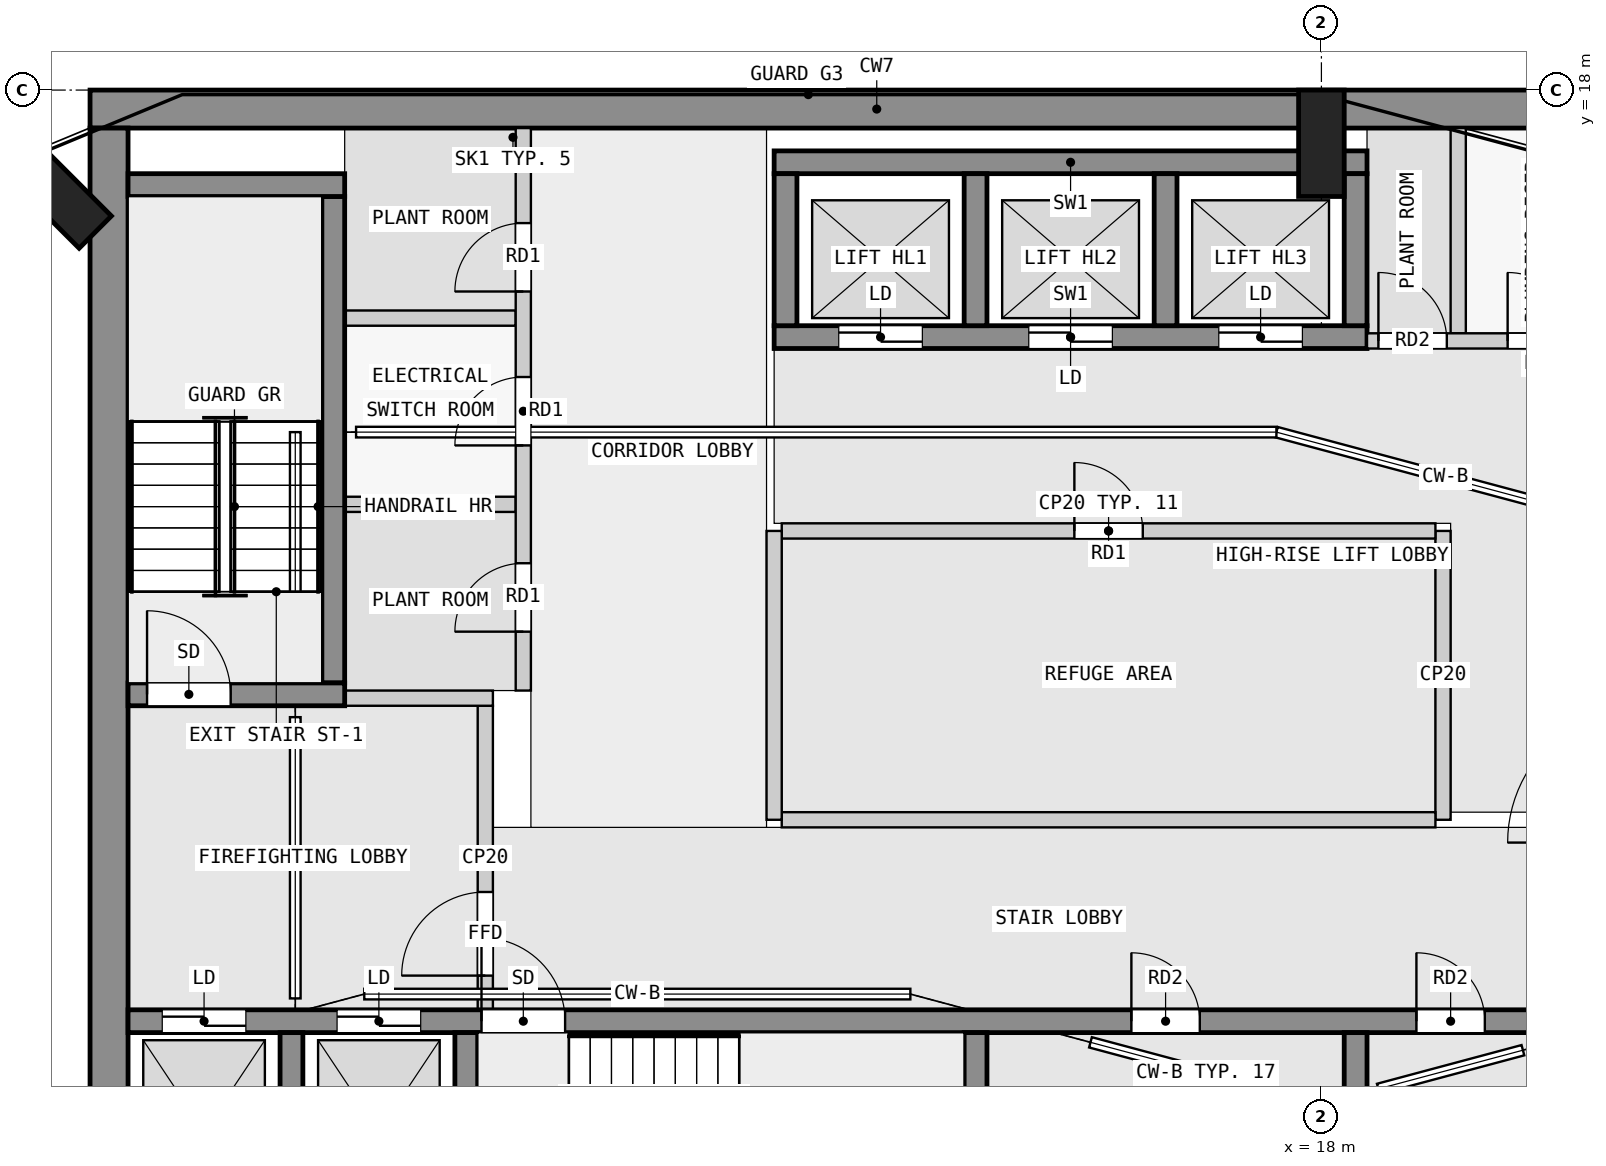
"""IFC4 building model, lengths in metres.
Left out: names, types, materials, properties, quantities, classifications, styles, units other than length and angle.
Written with IfcOpenShell. Run it as: python <this file> out.ifc"""

import sys

from ifc_helpers import new_model, si_unit, direction, frame, frame_2d, origin, origin_2d, place, context, subcontext, project, spatial, rectangle, extrude, element, fill, save


model = new_model("IFC4")
c1 = context("Model", 3, precision=1e-05, world=origin(), true_north=direction((0.0, 1.0)))
c2 = subcontext(c1, "Body", "Model", "MODEL_VIEW")
j1 = project(units=[si_unit("LENGTHUNIT", "METRE"), si_unit("PLANEANGLEUNIT", "RADIAN")], contexts=[c1])
p1 = place(None, origin())
s1 = spatial("IfcSite", under=j1, at=p1, CompositionType="ELEMENT")
p2 = place(p1, origin())
s2 = spatial("IfcBuilding", under=s1, at=p2, CompositionType="ELEMENT")
p3 = place(p2, frame((0.0, 0.0, 236.4)))
s3 = spatial("IfcBuildingStorey", under=s2, at=p3, CompositionType="ELEMENT", Elevation=236.4)
for number, where, z_axis, x_axis in (
    (1, (18.0, 17.3, 0.0), (0.0, 0.0, 1.0), (1.0, 0.0, 0.0)),
    (2, (1.374, 16.626, 0.0), (0.0, 0.0, 1.0), (0.707, 0.707, 0.0)),
):
    element("IfcColumn", number, at=place(p3, frame(where, z_axis=z_axis, x_axis=x_axis)), inside=s3, PredefinedType="COLUMN", context=c2, shape_type="SweptSolid", body=[
        extrude(rectangle(XDim=0.6, YDim=1.4, at=origin_2d()), origin(), (0.0, 0.0, 1.0), 6.0),
    ])
p4 = place(p3, frame((1.8, 17.75, 0.0), z_axis=(0.0, 0.0, 1.0), x_axis=(1.0, 0.0, 0.0)))
e3 = element("IfcWall", 3, at=p4, inside=s3, PredefinedType="SHEAR", context=c2, shape_type="SweptSolid", body=[
    extrude(rectangle(XDim=20.7, YDim=0.5, at=frame_2d((10.35, 0.0))), origin(), (0.0, 0.0, 1.0), 5.75),
])
p5 = place(p3, frame((2.05, 2.5, 0.0), z_axis=(0.0, 0.0, 1.0), x_axis=(0.0, 1.0, 0.0)))
e4 = element("IfcWall", 4, at=p5, inside=s3, PredefinedType="SHEAR", context=c2, shape_type="SweptSolid", body=[
    extrude(rectangle(XDim=15.0, YDim=0.5, at=frame_2d((7.5, 0.0))), origin(), (0.0, 0.0, 1.0), 5.75),
])
for number, where, z_axis, x_axis in (
    (5, (4.45, 2.8, 0.0), (0.0, 0.0, 1.0), (0.0, 1.0, 0.0)),
    (6, (6.75, 2.8, 0.0), (0.0, 0.0, 1.0), (0.0, 1.0, 0.0)),
    (7, (13.45, 2.8, 0.0), (0.0, 0.0, 1.0), (0.0, 1.0, 0.0)),
    (8, (18.45, 2.8, 0.0), (0.0, 0.0, 1.0), (0.0, 1.0, 0.0)),
):
    element("IfcWall", number, at=place(p3, frame(where, z_axis=z_axis, x_axis=x_axis)), inside=s3, PredefinedType="SHEAR", context=c2, shape_type="SweptSolid", body=[
        extrude(rectangle(XDim=2.8, YDim=0.3, at=frame_2d((1.4, 0.0))), origin(), (0.0, 0.0, 1.0), 5.75),
    ])
p6 = place(p3, frame((2.3, 5.75, 0.0), z_axis=(0.0, 0.0, 1.0), x_axis=(1.0, 0.0, 0.0)))
e9 = element("IfcWall", 9, at=p6, inside=s3, PredefinedType="SHEAR", context=c2, shape_type="SweptSolid", body=[
    extrude(rectangle(XDim=18.8, YDim=0.3, at=frame_2d((9.4, 0.0))), origin(), (0.0, 0.0, 1.0), 5.75),
])
p7 = place(p6, frame((4.65, 0.0, 0.0)))
e10 = element("IfcOpeningElement", 10, at=p7, cuts=e9, PredefinedType="OPENING", context=c2, shape_type="SweptSolid", body=[
    extrude(rectangle(XDim=1.1, YDim=2.1, at=frame_2d((0.55, 1.05))), frame((0.0, 0.16, 0.0), z_axis=(0.0, -1.0, 0.0), x_axis=(1.0, 0.0, 0.0)), (0.0, 0.0, 1.0), 0.32),
])
p8 = place(p6, frame((0.45, 0.0, 0.0)))
e11 = element("IfcOpeningElement", 11, at=p8, cuts=e9, PredefinedType="OPENING", context=c2, shape_type="SweptSolid", body=[
    extrude(rectangle(XDim=1.1, YDim=2.1, at=frame_2d((0.55, 1.05))), frame((0.0, 0.16, 0.0), z_axis=(0.0, -1.0, 0.0), x_axis=(1.0, 0.0, 0.0)), (0.0, 0.0, 1.0), 0.32),
])
p9 = place(p6, frame((2.75, 0.0, 0.0)))
e12 = element("IfcOpeningElement", 12, at=p9, cuts=e9, PredefinedType="OPENING", context=c2, shape_type="SweptSolid", body=[
    extrude(rectangle(XDim=1.1, YDim=2.1, at=frame_2d((0.55, 1.05))), frame((0.0, 0.16, 0.0), z_axis=(0.0, -1.0, 0.0), x_axis=(1.0, 0.0, 0.0)), (0.0, 0.0, 1.0), 0.32),
])
p10 = place(p6, frame((13.2, 0.0, 0.0)))
e13 = element("IfcOpeningElement", 13, at=p10, cuts=e9, PredefinedType="OPENING", context=c2, shape_type="SweptSolid", body=[
    extrude(rectangle(XDim=0.9, YDim=2.1, at=frame_2d((0.45, 1.05))), frame((0.0, 0.16, 0.0), z_axis=(0.0, -1.0, 0.0), x_axis=(1.0, 0.0, 0.0)), (0.0, 0.0, 1.0), 0.32),
])
p11 = place(p6, frame((16.95, 0.0, 0.0)))
e14 = element("IfcOpeningElement", 14, at=p11, cuts=e9, PredefinedType="OPENING", context=c2, shape_type="SweptSolid", body=[
    extrude(rectangle(XDim=0.9, YDim=2.1, at=frame_2d((0.45, 1.05))), frame((0.0, 0.16, 0.0), z_axis=(0.0, -1.0, 0.0), x_axis=(1.0, 0.0, 0.0)), (0.0, 0.0, 1.0), 0.32),
])
p12 = place(p3, frame((2.3, 10.05, 0.0), z_axis=(0.0, 0.0, 1.0), x_axis=(1.0, 0.0, 0.0)))
e15 = element("IfcWall", 15, at=p12, inside=s3, PredefinedType="SHEAR", context=c2, shape_type="SweptSolid", body=[
    extrude(rectangle(XDim=2.85, YDim=0.3, at=frame_2d((1.425, 0.0))), origin(), (0.0, 0.0, 1.0), 5.75),
])
p13 = place(p12, frame((0.25, 0.0, 0.0)))
e16 = element("IfcOpeningElement", 16, at=p13, cuts=e15, PredefinedType="OPENING", context=c2, shape_type="SweptSolid", body=[
    extrude(rectangle(XDim=1.1, YDim=2.1, at=frame_2d((0.55, 1.05))), frame((0.0, 0.16, 0.0), z_axis=(0.0, -1.0, 0.0), x_axis=(1.0, 0.0, 0.0)), (0.0, 0.0, 1.0), 0.32),
])
p14 = place(p3, frame((5.0, 10.2, 0.0), z_axis=(0.0, 0.0, 1.0), x_axis=(0.0, 1.0, 0.0)))
e17 = element("IfcWall", 17, at=p14, inside=s3, PredefinedType="SHEAR", context=c2, shape_type="SweptSolid", body=[
    extrude(rectangle(XDim=6.4, YDim=0.3, at=frame_2d((3.2, 0.0))), origin(), (0.0, 0.0, 1.0), 5.75),
])
p15 = place(p3, frame((2.3, 16.75, 0.0), z_axis=(0.0, 0.0, 1.0), x_axis=(1.0, 0.0, 0.0)))
e18 = element("IfcWall", 18, at=p15, inside=s3, PredefinedType="SHEAR", context=c2, shape_type="SweptSolid", body=[
    extrude(rectangle(XDim=2.85, YDim=0.3, at=frame_2d((1.425, 0.0))), origin(), (0.0, 0.0, 1.0), 5.75),
])
p16 = place(p3, frame((10.8, 17.05, 0.0), z_axis=(0.0, 0.0, 1.0), x_axis=(1.0, 0.0, 0.0)))
e19 = element("IfcWall", 19, at=p16, inside=s3, PredefinedType="SHEAR", context=c2, shape_type="SweptSolid", body=[
    extrude(rectangle(XDim=7.8, YDim=0.3, at=frame_2d((3.9, 0.0))), origin(), (0.0, 0.0, 1.0), 5.75),
])
p17 = place(p3, frame((10.8, 14.75, 0.0), z_axis=(0.0, 0.0, 1.0), x_axis=(1.0, 0.0, 0.0)))
e20 = element("IfcWall", 20, at=p17, inside=s3, PredefinedType="SHEAR", context=c2, shape_type="SweptSolid", body=[
    extrude(rectangle(XDim=7.8, YDim=0.3, at=frame_2d((3.9, 0.0))), origin(), (0.0, 0.0, 1.0), 5.75),
])
p18 = place(p17, frame((0.85, 0.0, 0.0)))
e21 = element("IfcOpeningElement", 21, at=p18, cuts=e20, PredefinedType="OPENING", context=c2, shape_type="SweptSolid", body=[
    extrude(rectangle(XDim=1.1, YDim=2.1, at=frame_2d((0.55, 1.05))), frame((0.0, 0.16, 0.0), z_axis=(0.0, -1.0, 0.0), x_axis=(1.0, 0.0, 0.0)), (0.0, 0.0, 1.0), 0.32),
])
p19 = place(p17, frame((3.35, 0.0, 0.0)))
e22 = element("IfcOpeningElement", 22, at=p19, cuts=e20, PredefinedType="OPENING", context=c2, shape_type="SweptSolid", body=[
    extrude(rectangle(XDim=1.1, YDim=2.1, at=frame_2d((0.55, 1.05))), frame((0.0, 0.16, 0.0), z_axis=(0.0, -1.0, 0.0), x_axis=(1.0, 0.0, 0.0)), (0.0, 0.0, 1.0), 0.32),
])
p20 = place(p17, frame((5.85, 0.0, 0.0)))
e23 = element("IfcOpeningElement", 23, at=p20, cuts=e20, PredefinedType="OPENING", context=c2, shape_type="SweptSolid", body=[
    extrude(rectangle(XDim=1.1, YDim=2.1, at=frame_2d((0.55, 1.05))), frame((0.0, 0.16, 0.0), z_axis=(0.0, -1.0, 0.0), x_axis=(1.0, 0.0, 0.0)), (0.0, 0.0, 1.0), 0.32),
])
for number, where, z_axis, x_axis in (
    (24, (10.95, 14.9, 0.0), (0.0, 0.0, 1.0), (0.0, 1.0, 0.0)),
    (25, (13.45, 14.9, 0.0), (0.0, 0.0, 1.0), (0.0, 1.0, 0.0)),
    (26, (15.95, 14.9, 0.0), (0.0, 0.0, 1.0), (0.0, 1.0, 0.0)),
    (27, (18.45, 14.9, 0.0), (0.0, 0.0, 1.0), (0.0, 1.0, 0.0)),
):
    element("IfcWall", number, at=place(p3, frame(where, z_axis=z_axis, x_axis=x_axis)), inside=s3, PredefinedType="SHEAR", context=c2, shape_type="SweptSolid", body=[
        extrude(rectangle(XDim=2.0, YDim=0.3, at=frame_2d((1.0, 0.0))), origin(), (0.0, 0.0, 1.0), 5.75),
    ])
p21 = place(p3, frame((7.0, 5.9, 0.0), z_axis=(0.0, 0.0, 1.0), x_axis=(0.0, 1.0, 0.0)))
e28 = element("IfcWall", 28, at=p21, inside=s3, PredefinedType="PARTITIONING", context=c2, shape_type="SweptSolid", body=[
    extrude(rectangle(XDim=4.0, YDim=0.2, at=frame_2d((2.0, 0.0))), origin(), (0.0, 0.0, 1.0), 5.75),
])
p22 = place(p21, frame((0.45, 0.0, 0.0)))
e29 = element("IfcOpeningElement", 29, at=p22, cuts=e28, PredefinedType="OPENING", context=c2, shape_type="SweptSolid", body=[
    extrude(rectangle(XDim=1.1, YDim=2.1, at=frame_2d((0.55, 1.05))), frame((0.0, 0.11, 0.0), z_axis=(0.0, -1.0, 0.0), x_axis=(1.0, 0.0, 0.0)), (0.0, 0.0, 1.0), 0.22),
])
p23 = place(p3, frame((5.15, 10.0, 0.0), z_axis=(0.0, 0.0, 1.0), x_axis=(1.0, 0.0, 0.0)))
e30 = element("IfcWall", 30, at=p23, inside=s3, PredefinedType="PARTITIONING", context=c2, shape_type="SweptSolid", body=[
    extrude(rectangle(XDim=1.95, YDim=0.2, at=frame_2d((0.975, 0.0))), origin(), (0.0, 0.0, 1.0), 5.75),
])
p24 = place(p3, frame((10.8, 8.4, 0.0), z_axis=(0.0, 0.0, 1.0), x_axis=(0.0, 1.0, 0.0)))
e31 = element("IfcWall", 31, at=p24, inside=s3, PredefinedType="PARTITIONING", context=c2, shape_type="SweptSolid", body=[
    extrude(rectangle(XDim=3.8, YDim=0.2, at=frame_2d((1.9, 0.0))), origin(), (0.0, 0.0, 1.0), 5.75),
])
p25 = place(p3, frame((10.9, 8.4, 0.0), z_axis=(0.0, 0.0, 1.0), x_axis=(1.0, 0.0, 0.0)))
e32 = element("IfcWall", 32, at=p25, inside=s3, PredefinedType="PARTITIONING", context=c2, shape_type="SweptSolid", body=[
    extrude(rectangle(XDim=8.6, YDim=0.2, at=frame_2d((4.3, 0.0))), origin(), (0.0, 0.0, 1.0), 5.75),
])
p26 = place(p3, frame((19.6, 8.4, 0.0), z_axis=(0.0, 0.0, 1.0), x_axis=(0.0, 1.0, 0.0)))
e33 = element("IfcWall", 33, at=p26, inside=s3, PredefinedType="PARTITIONING", context=c2, shape_type="SweptSolid", body=[
    extrude(rectangle(XDim=3.8, YDim=0.2, at=frame_2d((1.9, 0.0))), origin(), (0.0, 0.0, 1.0), 5.75),
])
p27 = place(p3, frame((10.9, 12.2, 0.0), z_axis=(0.0, 0.0, 1.0), x_axis=(1.0, 0.0, 0.0)))
e34 = element("IfcWall", 34, at=p27, inside=s3, PredefinedType="PARTITIONING", context=c2, shape_type="SweptSolid", body=[
    extrude(rectangle(XDim=8.6, YDim=0.2, at=frame_2d((4.3, 0.0))), origin(), (0.0, 0.0, 1.0), 5.75),
])
p28 = place(p27, frame((3.85, 0.0, 0.0)))
e35 = element("IfcOpeningElement", 35, at=p28, cuts=e34, PredefinedType="OPENING", context=c2, shape_type="SweptSolid", body=[
    extrude(rectangle(XDim=0.9, YDim=2.1, at=frame_2d((0.45, 1.05))), frame((0.0, 0.11, 0.0), z_axis=(0.0, -1.0, 0.0), x_axis=(1.0, 0.0, 0.0)), (0.0, 0.0, 1.0), 0.22),
])
p29 = place(p3, frame((7.5, 10.1, 0.0), z_axis=(0.0, 0.0, 1.0), x_axis=(0.0, 1.0, 0.0)))
e36 = element("IfcWall", 36, at=p29, inside=s3, PredefinedType="PARTITIONING", context=c2, shape_type="SweptSolid", body=[
    extrude(rectangle(XDim=7.4, YDim=0.2, at=frame_2d((3.7, 0.0))), origin(), (0.0, 0.0, 1.0), 5.75),
])
p30 = place(p29, frame((0.775, 0.0, 0.0)))
e37 = element("IfcOpeningElement", 37, at=p30, cuts=e36, PredefinedType="OPENING", context=c2, shape_type="SweptSolid", body=[
    extrude(rectangle(XDim=0.9, YDim=2.1, at=frame_2d((0.45, 1.05))), frame((0.0, 0.11, 0.0), z_axis=(0.0, -1.0, 0.0), x_axis=(1.0, 0.0, 0.0)), (0.0, 0.0, 1.0), 0.22),
])
p31 = place(p29, frame((3.225, 0.0, 0.0)))
e38 = element("IfcOpeningElement", 38, at=p31, cuts=e36, PredefinedType="OPENING", context=c2, shape_type="SweptSolid", body=[
    extrude(rectangle(XDim=0.9, YDim=2.1, at=frame_2d((0.45, 1.05))), frame((0.0, 0.11, 0.0), z_axis=(0.0, -1.0, 0.0), x_axis=(1.0, 0.0, 0.0)), (0.0, 0.0, 1.0), 0.22),
])
p32 = place(p29, frame((5.25, 0.0, 0.0)))
e39 = element("IfcOpeningElement", 39, at=p32, cuts=e36, PredefinedType="OPENING", context=c2, shape_type="SweptSolid", body=[
    extrude(rectangle(XDim=0.9, YDim=2.1, at=frame_2d((0.45, 1.05))), frame((0.0, 0.11, 0.0), z_axis=(0.0, -1.0, 0.0), x_axis=(1.0, 0.0, 0.0)), (0.0, 0.0, 1.0), 0.22),
])
for number, where, z_axis, x_axis in (
    (40, (5.15, 12.55, 0.0), (0.0, 0.0, 1.0), (1.0, 0.0, 0.0)),
    (41, (5.15, 15.0, 0.0), (0.0, 0.0, 1.0), (1.0, 0.0, 0.0)),
):
    element("IfcWall", number, at=place(p3, frame(where, z_axis=z_axis, x_axis=x_axis)), inside=s3, PredefinedType="PARTITIONING", context=c2, shape_type="SweptSolid", body=[
        extrude(rectangle(XDim=2.25, YDim=0.2, at=frame_2d((1.125, 0.0))), origin(), (0.0, 0.0, 1.0), 5.75),
    ])
p33 = place(p3, frame((18.6, 14.7, 0.0), z_axis=(0.0, 0.0, 1.0), x_axis=(1.0, 0.0, 0.0)))
e42 = element("IfcWall", 42, at=p33, inside=s3, PredefinedType="PARTITIONING", context=c2, shape_type="SweptSolid", body=[
    extrude(rectangle(XDim=3.4, YDim=0.2, at=frame_2d((1.7, 0.0))), origin(), (0.0, 0.0, 1.0), 5.75),
])
p34 = place(p33, frame((0.15, 0.0, 0.0)))
e43 = element("IfcOpeningElement", 43, at=p34, cuts=e42, PredefinedType="OPENING", context=c2, shape_type="SweptSolid", body=[
    extrude(rectangle(XDim=0.9, YDim=2.1, at=frame_2d((0.45, 1.05))), frame((0.0, 0.11, 0.0), z_axis=(0.0, -1.0, 0.0), x_axis=(1.0, 0.0, 0.0)), (0.0, 0.0, 1.0), 0.22),
])
p35 = place(p33, frame((1.85, 0.0, 0.0)))
e44 = element("IfcOpeningElement", 44, at=p35, cuts=e42, PredefinedType="OPENING", context=c2, shape_type="SweptSolid", body=[
    extrude(rectangle(XDim=0.9, YDim=2.1, at=frame_2d((0.45, 1.05))), frame((0.0, 0.11, 0.0), z_axis=(0.0, -1.0, 0.0), x_axis=(1.0, 0.0, 0.0)), (0.0, 0.0, 1.0), 0.22),
])
p36 = place(p3, frame((19.8, 14.8, 0.0), z_axis=(0.0, 0.0, 1.0), x_axis=(0.0, 1.0, 0.0)))
e45 = element("IfcWall", 45, at=p36, inside=s3, PredefinedType="PARTITIONING", context=c2, shape_type="SweptSolid", body=[
    extrude(rectangle(XDim=2.7, YDim=0.2, at=frame_2d((1.35, 0.0))), origin(), (0.0, 0.0, 1.0), 5.75),
])
p37 = place(p22, origin())
e46 = element("IfcDoor", 46, at=p37, inside=s3, OperationType="SINGLE_SWING_LEFT", PredefinedType="DOOR", context=c2, shape_type="SweptSolid", body=[
    extrude(rectangle(XDim=1.1, YDim=2.1, at=frame_2d((0.55, 1.05))), frame((0.0, 0.025, 0.0), z_axis=(0.0, -1.0, 0.0), x_axis=(1.0, 0.0, 0.0)), (0.0, 0.0, 1.0), 0.05),
])
fill(e29, e46)
p38 = place(p13, origin())
e47 = element("IfcDoor", 47, at=p38, inside=s3, OperationType="SINGLE_SWING_RIGHT", PredefinedType="DOOR", context=c2, shape_type="SweptSolid", body=[
    extrude(rectangle(XDim=1.1, YDim=2.1, at=frame_2d((0.55, 1.05))), frame((0.0, 0.025, 0.0), z_axis=(0.0, -1.0, 0.0), x_axis=(1.0, 0.0, 0.0)), (0.0, 0.0, 1.0), 0.05),
])
fill(e16, e47)
p39 = place(p28, origin())
e48 = element("IfcDoor", 48, at=p39, inside=s3, OperationType="SINGLE_SWING_LEFT", PredefinedType="DOOR", context=c2, shape_type="SweptSolid", body=[
    extrude(rectangle(XDim=0.9, YDim=2.1, at=frame_2d((0.45, 1.05))), frame((0.0, 0.025, 0.0), z_axis=(0.0, -1.0, 0.0), x_axis=(1.0, 0.0, 0.0)), (0.0, 0.0, 1.0), 0.05),
])
fill(e35, e48)
p40 = place(p7, origin())
e49 = element("IfcDoor", 49, at=p40, inside=s3, OperationType="SINGLE_SWING_LEFT", PredefinedType="DOOR", context=c2, shape_type="SweptSolid", body=[
    extrude(rectangle(XDim=1.1, YDim=2.1, at=frame_2d((0.55, 1.05))), frame((0.0, 0.025, 0.0), z_axis=(0.0, -1.0, 0.0), x_axis=(1.0, 0.0, 0.0)), (0.0, 0.0, 1.0), 0.05),
])
fill(e10, e49)
p41 = place(p8, origin())
e50 = element("IfcDoor", 50, at=p41, inside=s3, OperationType="DOUBLE_DOOR_SLIDING", PredefinedType="DOOR", context=c2, shape_type="SweptSolid", body=[
    extrude(rectangle(XDim=1.1, YDim=2.1, at=frame_2d((0.55, 1.05))), frame((0.0, 0.025, 0.0), z_axis=(0.0, -1.0, 0.0), x_axis=(1.0, 0.0, 0.0)), (0.0, 0.0, 1.0), 0.05),
])
fill(e11, e50)
p42 = place(p9, origin())
e51 = element("IfcDoor", 51, at=p42, inside=s3, OperationType="DOUBLE_DOOR_SLIDING", PredefinedType="DOOR", context=c2, shape_type="SweptSolid", body=[
    extrude(rectangle(XDim=1.1, YDim=2.1, at=frame_2d((0.55, 1.05))), frame((0.0, 0.025, 0.0), z_axis=(0.0, -1.0, 0.0), x_axis=(1.0, 0.0, 0.0)), (0.0, 0.0, 1.0), 0.05),
])
fill(e12, e51)
p43 = place(p18, origin())
e52 = element("IfcDoor", 52, at=p43, inside=s3, OperationType="DOUBLE_DOOR_SLIDING", PredefinedType="DOOR", context=c2, shape_type="SweptSolid", body=[
    extrude(rectangle(XDim=1.1, YDim=2.1, at=frame_2d((0.55, 1.05))), frame((0.0, 0.025, 0.0), z_axis=(0.0, -1.0, 0.0), x_axis=(1.0, 0.0, 0.0)), (0.0, 0.0, 1.0), 0.05),
])
fill(e21, e52)
p44 = place(p19, origin())
e53 = element("IfcDoor", 53, at=p44, inside=s3, OperationType="DOUBLE_DOOR_SLIDING", PredefinedType="DOOR", context=c2, shape_type="SweptSolid", body=[
    extrude(rectangle(XDim=1.1, YDim=2.1, at=frame_2d((0.55, 1.05))), frame((0.0, 0.025, 0.0), z_axis=(0.0, -1.0, 0.0), x_axis=(1.0, 0.0, 0.0)), (0.0, 0.0, 1.0), 0.05),
])
fill(e22, e53)
p45 = place(p20, origin())
e54 = element("IfcDoor", 54, at=p45, inside=s3, OperationType="DOUBLE_DOOR_SLIDING", PredefinedType="DOOR", context=c2, shape_type="SweptSolid", body=[
    extrude(rectangle(XDim=1.1, YDim=2.1, at=frame_2d((0.55, 1.05))), frame((0.0, 0.025, 0.0), z_axis=(0.0, -1.0, 0.0), x_axis=(1.0, 0.0, 0.0)), (0.0, 0.0, 1.0), 0.05),
])
fill(e23, e54)
p46 = place(p30, origin())
e55 = element("IfcDoor", 55, at=p46, inside=s3, OperationType="SINGLE_SWING_RIGHT", PredefinedType="DOOR", context=c2, shape_type="SweptSolid", body=[
    extrude(rectangle(XDim=0.9, YDim=2.1, at=frame_2d((0.45, 1.05))), frame((0.0, 0.025, 0.0), z_axis=(0.0, -1.0, 0.0), x_axis=(1.0, 0.0, 0.0)), (0.0, 0.0, 1.0), 0.05),
])
fill(e37, e55)
p47 = place(p31, origin())
e56 = element("IfcDoor", 56, at=p47, inside=s3, OperationType="SINGLE_SWING_RIGHT", PredefinedType="DOOR", context=c2, shape_type="SweptSolid", body=[
    extrude(rectangle(XDim=0.9, YDim=2.1, at=frame_2d((0.45, 1.05))), frame((0.0, 0.025, 0.0), z_axis=(0.0, -1.0, 0.0), x_axis=(1.0, 0.0, 0.0)), (0.0, 0.0, 1.0), 0.05),
])
fill(e38, e56)
p48 = place(p32, origin())
e57 = element("IfcDoor", 57, at=p48, inside=s3, OperationType="SINGLE_SWING_RIGHT", PredefinedType="DOOR", context=c2, shape_type="SweptSolid", body=[
    extrude(rectangle(XDim=0.9, YDim=2.1, at=frame_2d((0.45, 1.05))), frame((0.0, 0.025, 0.0), z_axis=(0.0, -1.0, 0.0), x_axis=(1.0, 0.0, 0.0)), (0.0, 0.0, 1.0), 0.05),
])
fill(e39, e57)
p49 = place(p34, origin())
e58 = element("IfcDoor", 58, at=p49, inside=s3, OperationType="SINGLE_SWING_LEFT", PredefinedType="DOOR", context=c2, shape_type="SweptSolid", body=[
    extrude(rectangle(XDim=0.9, YDim=2.1, at=frame_2d((0.45, 1.05))), frame((0.0, 0.025, 0.0), z_axis=(0.0, -1.0, 0.0), x_axis=(1.0, 0.0, 0.0)), (0.0, 0.0, 1.0), 0.05),
])
fill(e43, e58)
p50 = place(p35, origin())
e59 = element("IfcDoor", 59, at=p50, inside=s3, OperationType="SINGLE_SWING_LEFT", PredefinedType="DOOR", context=c2, shape_type="SweptSolid", body=[
    extrude(rectangle(XDim=0.9, YDim=2.1, at=frame_2d((0.45, 1.05))), frame((0.0, 0.025, 0.0), z_axis=(0.0, -1.0, 0.0), x_axis=(1.0, 0.0, 0.0)), (0.0, 0.0, 1.0), 0.05),
])
fill(e44, e59)
p51 = place(p10, origin())
e60 = element("IfcDoor", 60, at=p51, inside=s3, OperationType="SINGLE_SWING_LEFT", PredefinedType="DOOR", context=c2, shape_type="SweptSolid", body=[
    extrude(rectangle(XDim=0.9, YDim=2.1, at=frame_2d((0.45, 1.05))), frame((0.0, 0.025, 0.0), z_axis=(0.0, -1.0, 0.0), x_axis=(1.0, 0.0, 0.0)), (0.0, 0.0, 1.0), 0.05),
])
fill(e13, e60)
p52 = place(p11, origin())
e61 = element("IfcDoor", 61, at=p52, inside=s3, OperationType="SINGLE_SWING_LEFT", PredefinedType="DOOR", context=c2, shape_type="SweptSolid", body=[
    extrude(rectangle(XDim=0.9, YDim=2.1, at=frame_2d((0.45, 1.05))), frame((0.0, 0.025, 0.0), z_axis=(0.0, -1.0, 0.0), x_axis=(1.0, 0.0, 0.0)), (0.0, 0.0, 1.0), 0.05),
])
fill(e14, e61)
save(model, sys.argv[1])
